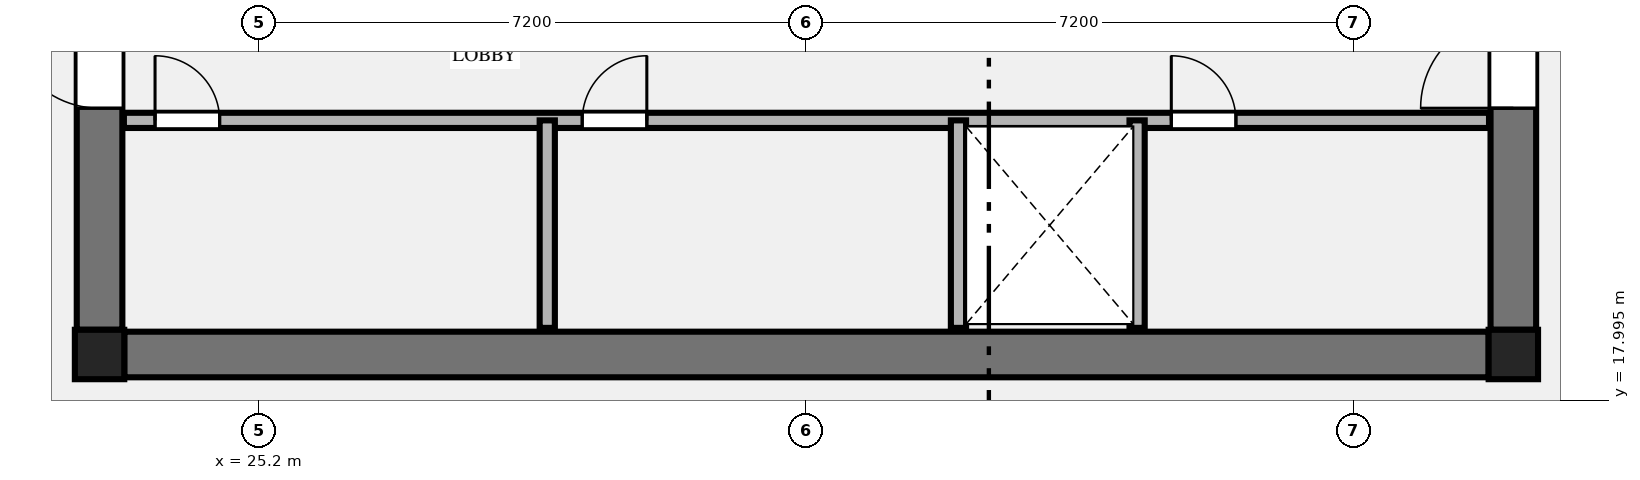
"""IFC4 building model, lengths in metres.
Left out: names, types, materials, properties, quantities, classifications, styles, units other than length and angle.
Written with IfcOpenShell. Run it as: python <this file> out.ifc"""

import sys

from ifc_helpers import new_model, si_unit, direction, frame, frame_2d, origin, origin_2d, place, context, subcontext, project, spatial, rectangle, extrude, element, fill, save


model = new_model("IFC4")
c1 = context("Model", 3, precision=1e-05, world=origin(), true_north=direction((0.0, 1.0)))
c2 = subcontext(c1, "Body", "Model", "MODEL_VIEW")
j1 = project(units=[si_unit("LENGTHUNIT", "METRE"), si_unit("PLANEANGLEUNIT", "RADIAN")], contexts=[c1])
p1 = place(None, origin())
s1 = spatial("IfcSite", under=j1, at=p1, CompositionType="ELEMENT")
p2 = place(p1, origin())
s2 = spatial("IfcBuilding", under=s1, at=p2, CompositionType="ELEMENT")
p3 = place(p2, frame((0.0, 0.0, 171.9)))
s3 = spatial("IfcBuildingStorey", under=s2, at=p3, CompositionType="ELEMENT", Elevation=171.9)
for number, where, z_axis, x_axis in (
    (1, (23.1, 18.6, 0.0), (0.0, 0.0, 1.0), (1.0, 0.0, 0.0)),
    (2, (41.7, 18.6, 0.0), (0.0, 0.0, 1.0), (1.0, 0.0, 0.0)),
):
    element("IfcColumn", number, at=place(p3, frame(where, z_axis=z_axis, x_axis=x_axis)), inside=s3, PredefinedType="COLUMN", context=c2, shape_type="SweptSolid", body=[
        extrude(rectangle(XDim=0.65, YDim=0.65, at=origin_2d()), origin(), (0.0, 0.0, 1.0), 3.55),
    ])
p4 = place(p3, frame((23.425, 18.6, 0.0), z_axis=(0.0, 0.0, 1.0), x_axis=(1.0, 0.0, 0.0)))
e3 = element("IfcWall", 3, at=p4, inside=s3, PredefinedType="SHEAR", context=c2, shape_type="SweptSolid", body=[
    extrude(rectangle(XDim=17.95, YDim=0.6, at=frame_2d((8.975, 0.0))), origin(), (0.0, 0.0, 1.0), 3.35),
])
p5 = place(p3, frame((23.1, 18.925, 0.0), z_axis=(0.0, 0.0, 1.0), x_axis=(0.0, 1.0, 0.0)))
e4 = element("IfcWall", 4, at=p5, inside=s3, PredefinedType="SHEAR", context=c2, shape_type="SweptSolid", body=[
    extrude(rectangle(XDim=13.95, YDim=0.6, at=frame_2d((6.975, 0.0))), origin(), (0.0, 0.0, 1.0), 3.35),
])
p6 = place(p5, frame((2.915, 0.0, 0.0)))
e5 = element("IfcOpeningElement", 5, at=p6, cuts=e4, PredefinedType="OPENING", context=c2, shape_type="SweptSolid", body=[
    extrude(rectangle(XDim=1.22, YDim=2.25, at=frame_2d((0.61, 1.125))), frame((0.0, 0.31, 0.0), z_axis=(0.0, -1.0, 0.0), x_axis=(1.0, 0.0, 0.0)), (0.0, 0.0, 1.0), 0.62),
])
p7 = place(p3, frame((41.7, 18.925, 0.0), z_axis=(0.0, 0.0, 1.0), x_axis=(0.0, 1.0, 0.0)))
e6 = element("IfcWall", 6, at=p7, inside=s3, PredefinedType="SHEAR", context=c2, shape_type="SweptSolid", body=[
    extrude(rectangle(XDim=13.95, YDim=0.6, at=frame_2d((6.975, 0.0))), origin(), (0.0, 0.0, 1.0), 3.35),
])
p8 = place(p7, frame((2.915, 0.0, 0.0)))
e7 = element("IfcOpeningElement", 7, at=p8, cuts=e6, PredefinedType="OPENING", context=c2, shape_type="SweptSolid", body=[
    extrude(rectangle(XDim=1.22, YDim=2.25, at=frame_2d((0.61, 1.125))), frame((0.0, 0.31, 0.0), z_axis=(0.0, -1.0, 0.0), x_axis=(1.0, 0.0, 0.0)), (0.0, 0.0, 1.0), 0.62),
])
p9 = place(p3, frame((23.42, 21.68, 0.0), z_axis=(0.0, 0.0, 1.0), x_axis=(1.0, 0.0, 0.0)))
e8 = element("IfcWall", 8, at=p9, inside=s3, PredefinedType="PLUMBINGWALL", context=c2, shape_type="SweptSolid", body=[
    extrude(rectangle(XDim=17.96, YDim=0.2, at=frame_2d((8.98, 0.0))), origin(), (0.0, 0.0, 1.0), 3.35),
])
p10 = place(p9, frame((0.41, 0.0, 0.0)))
e9 = element("IfcOpeningElement", 9, at=p10, cuts=e8, PredefinedType="OPENING", context=c2, shape_type="SweptSolid", body=[
    extrude(rectangle(XDim=0.85, YDim=2.05, at=frame_2d((0.425, 1.025))), frame((0.0, 0.11, 0.0), z_axis=(0.0, -1.0, 0.0), x_axis=(1.0, 0.0, 0.0)), (0.0, 0.0, 1.0), 0.22),
])
p11 = place(p9, frame((6.03, 0.0, 0.0)))
e10 = element("IfcOpeningElement", 10, at=p11, cuts=e8, PredefinedType="OPENING", context=c2, shape_type="SweptSolid", body=[
    extrude(rectangle(XDim=0.85, YDim=2.05, at=frame_2d((0.425, 1.025))), frame((0.0, 0.11, 0.0), z_axis=(0.0, -1.0, 0.0), x_axis=(1.0, 0.0, 0.0)), (0.0, 0.0, 1.0), 0.22),
])
p12 = place(p9, frame((13.78, 0.0, 0.0)))
e11 = element("IfcOpeningElement", 11, at=p12, cuts=e8, PredefinedType="OPENING", context=c2, shape_type="SweptSolid", body=[
    extrude(rectangle(XDim=0.85, YDim=2.05, at=frame_2d((0.425, 1.025))), frame((0.0, 0.11, 0.0), z_axis=(0.0, -1.0, 0.0), x_axis=(1.0, 0.0, 0.0)), (0.0, 0.0, 1.0), 0.22),
])
for number, where, z_axis, x_axis in (
    (12, (34.4, 18.95, 0.0), (0.0, 0.0, 1.0), (0.0, 1.0, 0.0)),
    (13, (36.75, 18.95, 0.0), (0.0, 0.0, 1.0), (0.0, 1.0, 0.0)),
    (14, (28.99, 18.95, 0.0), (0.0, 0.0, 1.0), (0.0, 1.0, 0.0)),
):
    element("IfcWall", number, at=place(p3, frame(where, z_axis=z_axis, x_axis=x_axis)), inside=s3, PredefinedType="PLUMBINGWALL", context=c2, shape_type="SweptSolid", body=[
        extrude(rectangle(XDim=2.73, YDim=0.2, at=frame_2d((1.365, 0.0))), origin(), (0.0, 0.0, 1.0), 3.35),
    ])
p13 = place(p6, origin())
e15 = element("IfcDoor", 15, at=p13, inside=s3, OperationType="SINGLE_SWING_RIGHT", PredefinedType="DOOR", context=c2, shape_type="SweptSolid", body=[
    extrude(rectangle(XDim=1.22, YDim=2.25, at=frame_2d((0.61, 1.125))), frame((0.0, 0.025, 0.0), z_axis=(0.0, -1.0, 0.0), x_axis=(1.0, 0.0, 0.0)), (0.0, 0.0, 1.0), 0.05),
])
fill(e5, e15)
p14 = place(p8, origin())
e16 = element("IfcDoor", 16, at=p14, inside=s3, OperationType="SINGLE_SWING_LEFT", PredefinedType="DOOR", context=c2, shape_type="SweptSolid", body=[
    extrude(rectangle(XDim=1.22, YDim=2.25, at=frame_2d((0.61, 1.125))), frame((0.0, 0.025, 0.0), z_axis=(0.0, -1.0, 0.0), x_axis=(1.0, 0.0, 0.0)), (0.0, 0.0, 1.0), 0.05),
])
fill(e7, e16)
p15 = place(p10, origin())
e17 = element("IfcDoor", 17, at=p15, inside=s3, OperationType="SINGLE_SWING_LEFT", PredefinedType="DOOR", context=c2, shape_type="SweptSolid", body=[
    extrude(rectangle(XDim=0.85, YDim=2.05, at=frame_2d((0.425, 1.025))), frame((0.0, 0.025, 0.0), z_axis=(0.0, -1.0, 0.0), x_axis=(1.0, 0.0, 0.0)), (0.0, 0.0, 1.0), 0.05),
])
fill(e9, e17)
p16 = place(p11, origin())
e18 = element("IfcDoor", 18, at=p16, inside=s3, OperationType="SINGLE_SWING_RIGHT", PredefinedType="DOOR", context=c2, shape_type="SweptSolid", body=[
    extrude(rectangle(XDim=0.85, YDim=2.05, at=frame_2d((0.425, 1.025))), frame((0.0, 0.025, 0.0), z_axis=(0.0, -1.0, 0.0), x_axis=(1.0, 0.0, 0.0)), (0.0, 0.0, 1.0), 0.05),
])
fill(e10, e18)
p17 = place(p12, origin())
e19 = element("IfcDoor", 19, at=p17, inside=s3, OperationType="SINGLE_SWING_LEFT", PredefinedType="DOOR", context=c2, shape_type="SweptSolid", body=[
    extrude(rectangle(XDim=0.85, YDim=2.05, at=frame_2d((0.425, 1.025))), frame((0.0, 0.025, 0.0), z_axis=(0.0, -1.0, 0.0), x_axis=(1.0, 0.0, 0.0)), (0.0, 0.0, 1.0), 0.05),
])
fill(e11, e19)
save(model, sys.argv[1])
